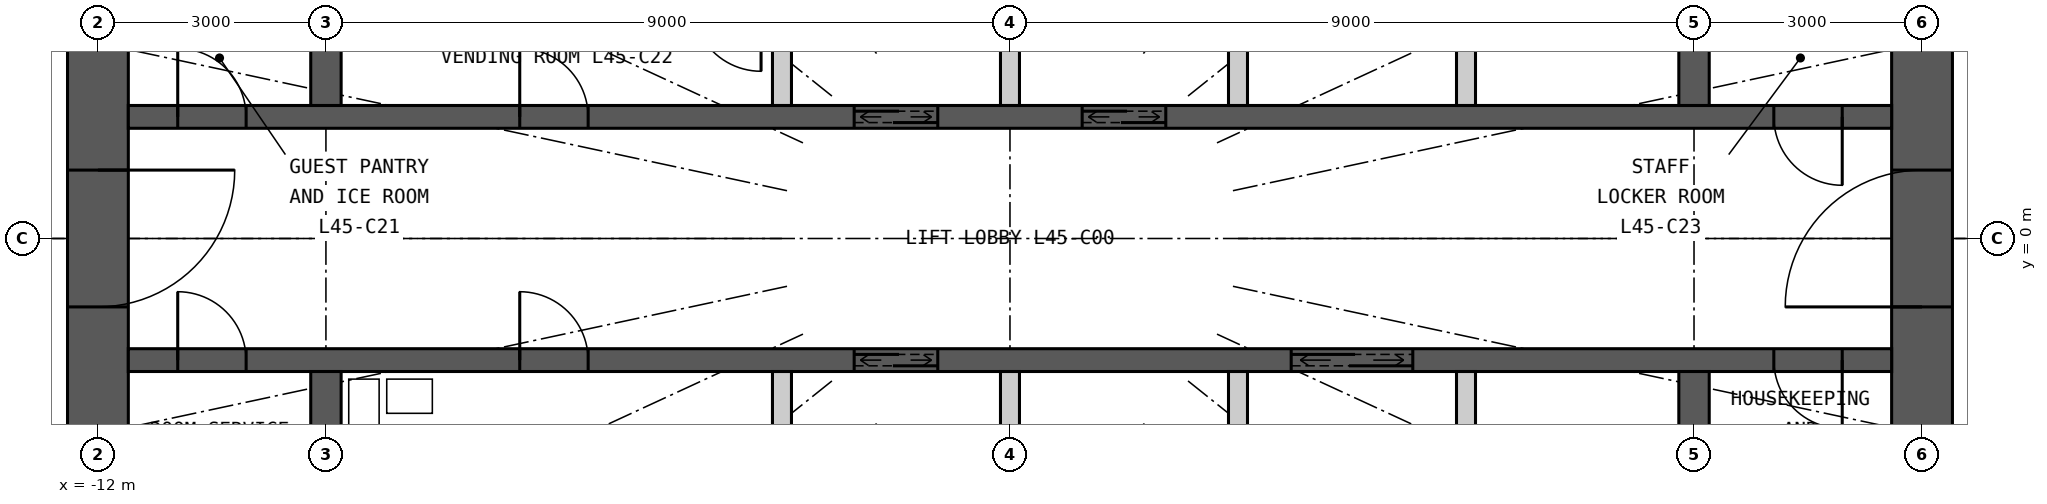
"""IFC4 building model, lengths in metres.
Left out: names, types, materials, properties, quantities, classifications, styles, units other than length and angle.
Written with IfcOpenShell. Run it as: python <this file> out.ifc"""

import sys

from ifc_helpers import new_model, si_unit, direction, frame, frame_2d, origin, place, context, subcontext, project, spatial, rectangle, extrude, element, fill, save


model = new_model("IFC4")
c1 = context("Model", 3, precision=1e-05, world=origin(), true_north=direction((0.0, 1.0)))
c2 = subcontext(c1, "Body", "Model", "MODEL_VIEW")
j1 = project(units=[si_unit("LENGTHUNIT", "METRE"), si_unit("PLANEANGLEUNIT", "RADIAN")], contexts=[c1])
p1 = place(None, origin())
s1 = spatial("IfcSite", under=j1, at=p1, CompositionType="ELEMENT")
p2 = place(p1, origin())
s2 = spatial("IfcBuilding", under=s1, at=p2, CompositionType="ELEMENT")
p3 = place(p2, frame((0.0, 0.0, 169.8)))
s3 = spatial("IfcBuildingStorey", under=s2, at=p3, CompositionType="ELEMENT", Elevation=169.8)
p4 = place(p3, frame((12.0, -7.6, 0.0), z_axis=(0.0, 0.0, 1.0), x_axis=(0.0, 1.0, 0.0)))
e1 = element("IfcWall", 1, at=p4, inside=s3, PredefinedType="SHEAR", context=c2, shape_type="SweptSolid", body=[
    extrude(rectangle(XDim=15.2, YDim=0.8, at=frame_2d((7.6, 0.0))), origin(), (0.0, 0.0, 1.0), 3.3),
])
p5 = place(p4, frame((6.7, 0.0, 0.0)))
e2 = element("IfcOpeningElement", 2, at=p5, cuts=e1, PredefinedType="OPENING", context=c2, shape_type="SweptSolid", body=[
    extrude(rectangle(XDim=1.8, YDim=2.2, at=frame_2d((0.9, 1.1))), frame((0.0, 0.41, 0.0), z_axis=(0.0, -1.0, 0.0), x_axis=(1.0, 0.0, 0.0)), (0.0, 0.0, 1.0), 0.82),
])
p6 = place(p3, frame((-12.0, 7.6, 0.0), z_axis=(0.0, 0.0, 1.0), x_axis=(0.0, -1.0, 0.0)))
e3 = element("IfcWall", 3, at=p6, inside=s3, PredefinedType="SHEAR", context=c2, shape_type="SweptSolid", body=[
    extrude(rectangle(XDim=15.2, YDim=0.8, at=frame_2d((7.6, 0.0))), origin(), (0.0, 0.0, 1.0), 3.3),
])
p7 = place(p6, frame((6.7, 0.0, 0.0)))
e4 = element("IfcOpeningElement", 4, at=p7, cuts=e3, PredefinedType="OPENING", context=c2, shape_type="SweptSolid", body=[
    extrude(rectangle(XDim=1.8, YDim=2.2, at=frame_2d((0.9, 1.1))), frame((0.0, 0.41, 0.0), z_axis=(0.0, -1.0, 0.0), x_axis=(1.0, 0.0, 0.0)), (0.0, 0.0, 1.0), 0.82),
])
p8 = place(p3, frame((-11.6, 1.6, 0.0), z_axis=(0.0, 0.0, 1.0), x_axis=(1.0, 0.0, 0.0)))
e5 = element("IfcWall", 5, at=p8, inside=s3, PredefinedType="SHEAR", context=c2, shape_type="SweptSolid", body=[
    extrude(rectangle(XDim=23.2, YDim=0.3, at=frame_2d((11.6, 0.0))), origin(), (0.0, 0.0, 1.0), 3.3),
])
p9 = place(p8, frame((9.55, 0.0, 0.0)))
e6 = element("IfcOpeningElement", 6, at=p9, cuts=e5, PredefinedType="OPENING", context=c2, shape_type="SweptSolid", body=[
    extrude(rectangle(XDim=1.1, YDim=2.2, at=frame_2d((0.55, 1.1))), frame((0.0, 0.16, 0.0), z_axis=(0.0, -1.0, 0.0), x_axis=(1.0, 0.0, 0.0)), (0.0, 0.0, 1.0), 0.32),
])
p10 = place(p8, frame((12.55, 0.0, 0.0)))
e7 = element("IfcOpeningElement", 7, at=p10, cuts=e5, PredefinedType="OPENING", context=c2, shape_type="SweptSolid", body=[
    extrude(rectangle(XDim=1.1, YDim=2.2, at=frame_2d((0.55, 1.1))), frame((0.0, 0.16, 0.0), z_axis=(0.0, -1.0, 0.0), x_axis=(1.0, 0.0, 0.0)), (0.0, 0.0, 1.0), 0.32),
])
p11 = place(p8, frame((0.65, 0.0, 0.0)))
e8 = element("IfcOpeningElement", 8, at=p11, cuts=e5, PredefinedType="OPENING", context=c2, shape_type="SweptSolid", body=[
    extrude(rectangle(XDim=0.9, YDim=2.2, at=frame_2d((0.45, 1.1))), frame((0.0, 0.16, 0.0), z_axis=(0.0, -1.0, 0.0), x_axis=(1.0, 0.0, 0.0)), (0.0, 0.0, 1.0), 0.32),
])
p12 = place(p8, frame((5.15, 0.0, 0.0)))
e9 = element("IfcOpeningElement", 9, at=p12, cuts=e5, PredefinedType="OPENING", context=c2, shape_type="SweptSolid", body=[
    extrude(rectangle(XDim=0.9, YDim=2.2, at=frame_2d((0.45, 1.1))), frame((0.0, 0.16, 0.0), z_axis=(0.0, -1.0, 0.0), x_axis=(1.0, 0.0, 0.0)), (0.0, 0.0, 1.0), 0.32),
])
p13 = place(p8, frame((21.65, 0.0, 0.0)))
e10 = element("IfcOpeningElement", 10, at=p13, cuts=e5, PredefinedType="OPENING", context=c2, shape_type="SweptSolid", body=[
    extrude(rectangle(XDim=0.9, YDim=2.2, at=frame_2d((0.45, 1.1))), frame((0.0, 0.16, 0.0), z_axis=(0.0, -1.0, 0.0), x_axis=(1.0, 0.0, 0.0)), (0.0, 0.0, 1.0), 0.32),
])
p14 = place(p3, frame((-11.6, -1.6, 0.0), z_axis=(0.0, 0.0, 1.0), x_axis=(1.0, 0.0, 0.0)))
e11 = element("IfcWall", 11, at=p14, inside=s3, PredefinedType="SHEAR", context=c2, shape_type="SweptSolid", body=[
    extrude(rectangle(XDim=23.2, YDim=0.3, at=frame_2d((11.6, 0.0))), origin(), (0.0, 0.0, 1.0), 3.3),
])
p15 = place(p14, frame((9.55, 0.0, 0.0)))
e12 = element("IfcOpeningElement", 12, at=p15, cuts=e11, PredefinedType="OPENING", context=c2, shape_type="SweptSolid", body=[
    extrude(rectangle(XDim=1.1, YDim=2.2, at=frame_2d((0.55, 1.1))), frame((0.0, 0.16, 0.0), z_axis=(0.0, -1.0, 0.0), x_axis=(1.0, 0.0, 0.0)), (0.0, 0.0, 1.0), 0.32),
])
p16 = place(p14, frame((15.3, 0.0, 0.0)))
e13 = element("IfcOpeningElement", 13, at=p16, cuts=e11, PredefinedType="OPENING", context=c2, shape_type="SweptSolid", body=[
    extrude(rectangle(XDim=1.6, YDim=2.4, at=frame_2d((0.8, 1.2))), frame((0.0, 0.16, 0.0), z_axis=(0.0, -1.0, 0.0), x_axis=(1.0, 0.0, 0.0)), (0.0, 0.0, 1.0), 0.32),
])
p17 = place(p14, frame((0.65, 0.0, 0.0)))
e14 = element("IfcOpeningElement", 14, at=p17, cuts=e11, PredefinedType="OPENING", context=c2, shape_type="SweptSolid", body=[
    extrude(rectangle(XDim=0.9, YDim=2.2, at=frame_2d((0.45, 1.1))), frame((0.0, 0.16, 0.0), z_axis=(0.0, -1.0, 0.0), x_axis=(1.0, 0.0, 0.0)), (0.0, 0.0, 1.0), 0.32),
])
p18 = place(p14, frame((5.15, 0.0, 0.0)))
e15 = element("IfcOpeningElement", 15, at=p18, cuts=e11, PredefinedType="OPENING", context=c2, shape_type="SweptSolid", body=[
    extrude(rectangle(XDim=0.9, YDim=2.2, at=frame_2d((0.45, 1.1))), frame((0.0, 0.16, 0.0), z_axis=(0.0, -1.0, 0.0), x_axis=(1.0, 0.0, 0.0)), (0.0, 0.0, 1.0), 0.32),
])
p19 = place(p14, frame((21.65, 0.0, 0.0)))
e16 = element("IfcOpeningElement", 16, at=p19, cuts=e11, PredefinedType="OPENING", context=c2, shape_type="SweptSolid", body=[
    extrude(rectangle(XDim=0.9, YDim=2.2, at=frame_2d((0.45, 1.1))), frame((0.0, 0.16, 0.0), z_axis=(0.0, -1.0, 0.0), x_axis=(1.0, 0.0, 0.0)), (0.0, 0.0, 1.0), 0.32),
])
for number, where, z_axis, x_axis in (
    (17, (-9.0, 1.75, 0.0), (0.0, 0.0, 1.0), (0.0, 1.0, 0.0)),
    (18, (-9.0, -4.1, 0.0), (0.0, 0.0, 1.0), (0.0, 1.0, 0.0)),
    (19, (9.0, 1.75, 0.0), (0.0, 0.0, 1.0), (0.0, 1.0, 0.0)),
    (20, (9.0, -4.1, 0.0), (0.0, 0.0, 1.0), (0.0, 1.0, 0.0)),
):
    element("IfcWall", number, at=place(p3, frame(where, z_axis=z_axis, x_axis=x_axis)), inside=s3, PredefinedType="SHEAR", context=c2, shape_type="SweptSolid", body=[
        extrude(rectangle(XDim=2.35, YDim=0.4, at=frame_2d((1.175, 0.0))), origin(), (0.0, 0.0, 1.0), 3.3),
    ])
for number, where, z_axis, x_axis in (
    (21, (-3.0, 1.75, 0.0), (0.0, 0.0, 1.0), (0.0, 1.0, 0.0)),
    (22, (0.0, 1.75, 0.0), (0.0, 0.0, 1.0), (0.0, 1.0, 0.0)),
    (23, (3.0, 1.75, 0.0), (0.0, 0.0, 1.0), (0.0, 1.0, 0.0)),
    (24, (6.0, 1.75, 0.0), (0.0, 0.0, 1.0), (0.0, 1.0, 0.0)),
    (25, (-3.0, -4.1, 0.0), (0.0, 0.0, 1.0), (0.0, 1.0, 0.0)),
    (26, (0.0, -4.1, 0.0), (0.0, 0.0, 1.0), (0.0, 1.0, 0.0)),
    (27, (3.0, -4.1, 0.0), (0.0, 0.0, 1.0), (0.0, 1.0, 0.0)),
    (28, (6.0, -4.1, 0.0), (0.0, 0.0, 1.0), (0.0, 1.0, 0.0)),
):
    element("IfcWall", number, at=place(p3, frame(where, z_axis=z_axis, x_axis=x_axis)), inside=s3, PredefinedType="PARTITIONING", context=c2, shape_type="SweptSolid", body=[
        extrude(rectangle(XDim=2.35, YDim=0.25, at=frame_2d((1.175, 0.0))), origin(), (0.0, 0.0, 1.0), 3.3),
    ])
p20 = place(p9, origin())
e29 = element("IfcDoor", 29, at=p20, inside=s3, OperationType="DOUBLE_DOOR_SLIDING", PredefinedType="DOOR", context=c2, shape_type="SweptSolid", body=[
    extrude(rectangle(XDim=1.1, YDim=2.2, at=frame_2d((0.55, 1.1))), frame((0.0, 0.025, 0.0), z_axis=(0.0, -1.0, 0.0), x_axis=(1.0, 0.0, 0.0)), (0.0, 0.0, 1.0), 0.05),
])
fill(e6, e29)
p21 = place(p10, origin())
e30 = element("IfcDoor", 30, at=p21, inside=s3, OperationType="DOUBLE_DOOR_SLIDING", PredefinedType="DOOR", context=c2, shape_type="SweptSolid", body=[
    extrude(rectangle(XDim=1.1, YDim=2.2, at=frame_2d((0.55, 1.1))), frame((0.0, 0.025, 0.0), z_axis=(0.0, -1.0, 0.0), x_axis=(1.0, 0.0, 0.0)), (0.0, 0.0, 1.0), 0.05),
])
fill(e7, e30)
p22 = place(p15, origin())
e31 = element("IfcDoor", 31, at=p22, inside=s3, OperationType="DOUBLE_DOOR_SLIDING", PredefinedType="DOOR", context=c2, shape_type="SweptSolid", body=[
    extrude(rectangle(XDim=1.1, YDim=2.2, at=frame_2d((0.55, 1.1))), frame((0.0, 0.025, 0.0), z_axis=(0.0, -1.0, 0.0), x_axis=(1.0, 0.0, 0.0)), (0.0, 0.0, 1.0), 0.05),
])
fill(e12, e31)
p23 = place(p16, origin())
e32 = element("IfcDoor", 32, at=p23, inside=s3, OperationType="DOUBLE_DOOR_SLIDING", PredefinedType="DOOR", context=c2, shape_type="SweptSolid", body=[
    extrude(rectangle(XDim=1.6, YDim=2.4, at=frame_2d((0.8, 1.2))), frame((0.0, 0.025, 0.0), z_axis=(0.0, -1.0, 0.0), x_axis=(1.0, 0.0, 0.0)), (0.0, 0.0, 1.0), 0.05),
])
fill(e13, e32)
p24 = place(p11, origin())
e33 = element("IfcDoor", 33, at=p24, inside=s3, OperationType="SINGLE_SWING_LEFT", PredefinedType="DOOR", context=c2, shape_type="SweptSolid", body=[
    extrude(rectangle(XDim=0.9, YDim=2.2, at=frame_2d((0.45, 1.1))), frame((0.0, 0.025, 0.0), z_axis=(0.0, -1.0, 0.0), x_axis=(1.0, 0.0, 0.0)), (0.0, 0.0, 1.0), 0.05),
])
fill(e8, e33)
p25 = place(p12, origin())
e34 = element("IfcDoor", 34, at=p25, inside=s3, OperationType="SINGLE_SWING_LEFT", PredefinedType="DOOR", context=c2, shape_type="SweptSolid", body=[
    extrude(rectangle(XDim=0.9, YDim=2.2, at=frame_2d((0.45, 1.1))), frame((0.0, 0.025, 0.0), z_axis=(0.0, -1.0, 0.0), x_axis=(1.0, 0.0, 0.0)), (0.0, 0.0, 1.0), 0.05),
])
fill(e9, e34)
p26 = place(p17, origin())
e35 = element("IfcDoor", 35, at=p26, inside=s3, OperationType="SINGLE_SWING_LEFT", PredefinedType="DOOR", context=c2, shape_type="SweptSolid", body=[
    extrude(rectangle(XDim=0.9, YDim=2.2, at=frame_2d((0.45, 1.1))), frame((0.0, 0.025, 0.0), z_axis=(0.0, -1.0, 0.0), x_axis=(1.0, 0.0, 0.0)), (0.0, 0.0, 1.0), 0.05),
])
fill(e14, e35)
p27 = place(p18, origin())
e36 = element("IfcDoor", 36, at=p27, inside=s3, OperationType="SINGLE_SWING_LEFT", PredefinedType="DOOR", context=c2, shape_type="SweptSolid", body=[
    extrude(rectangle(XDim=0.9, YDim=2.2, at=frame_2d((0.45, 1.1))), frame((0.0, 0.025, 0.0), z_axis=(0.0, -1.0, 0.0), x_axis=(1.0, 0.0, 0.0)), (0.0, 0.0, 1.0), 0.05),
])
fill(e15, e36)
p28 = place(p19, origin())
e37 = element("IfcDoor", 37, at=p28, inside=s3, OperationType="SINGLE_SWING_RIGHT", PredefinedType="DOOR", context=c2, shape_type="SweptSolid", body=[
    extrude(rectangle(XDim=0.9, YDim=2.2, at=frame_2d((0.45, 1.1))), frame((0.0, 0.025, 0.0), z_axis=(0.0, -1.0, 0.0), x_axis=(1.0, 0.0, 0.0)), (0.0, 0.0, 1.0), 0.05),
])
fill(e16, e37)
p29 = place(p13, origin())
e38 = element("IfcDoor", 38, at=p29, inside=s3, OperationType="SINGLE_SWING_RIGHT", PredefinedType="DOOR", context=c2, shape_type="SweptSolid", body=[
    extrude(rectangle(XDim=0.9, YDim=2.2, at=frame_2d((0.45, 1.1))), frame((0.0, 0.025, 0.0), z_axis=(0.0, -1.0, 0.0), x_axis=(1.0, 0.0, 0.0)), (0.0, 0.0, 1.0), 0.05),
])
fill(e10, e38)
p30 = place(p5, origin())
e39 = element("IfcDoor", 39, at=p30, inside=s3, OperationType="DOUBLE_DOOR_DOUBLE_SWING", PredefinedType="DOOR", context=c2, shape_type="SweptSolid", body=[
    extrude(rectangle(XDim=1.8, YDim=2.2, at=frame_2d((0.9, 1.1))), frame((0.0, 0.025, 0.0), z_axis=(0.0, -1.0, 0.0), x_axis=(1.0, 0.0, 0.0)), (0.0, 0.0, 1.0), 0.05),
])
fill(e2, e39)
p31 = place(p7, origin())
e40 = element("IfcDoor", 40, at=p31, inside=s3, OperationType="DOUBLE_DOOR_DOUBLE_SWING", PredefinedType="DOOR", context=c2, shape_type="SweptSolid", body=[
    extrude(rectangle(XDim=1.8, YDim=2.2, at=frame_2d((0.9, 1.1))), frame((0.0, 0.025, 0.0), z_axis=(0.0, -1.0, 0.0), x_axis=(1.0, 0.0, 0.0)), (0.0, 0.0, 1.0), 0.05),
])
fill(e4, e40)
save(model, sys.argv[1])
